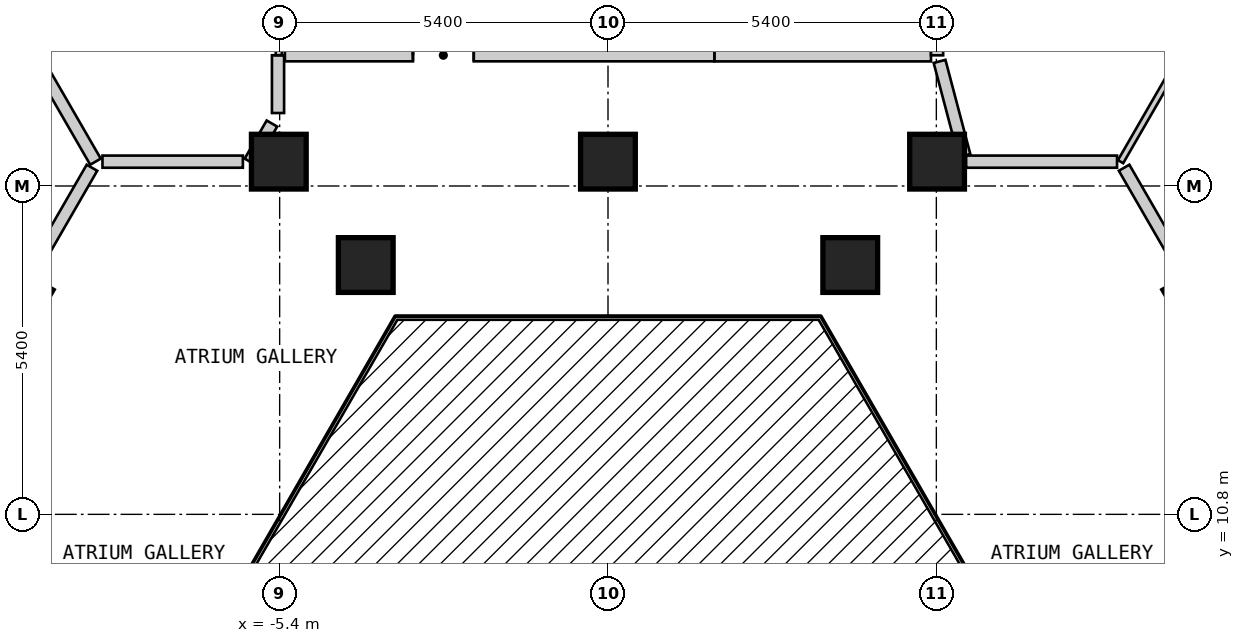
"""IFC4 building model, lengths in metres.
Left out: names, types, materials, properties, quantities, classifications, styles, units other than length and angle.
Written with IfcOpenShell. Run it as: python <this file> out.ifc"""

import sys

from ifc_helpers import new_model, si_unit, direction, frame, frame_2d, origin, origin_2d, place, context, subcontext, project, spatial, rectangle, extrude, element, fill, save


model = new_model("IFC4")
c1 = context("Model", 3, precision=1e-05, world=origin(), true_north=direction((0.0, 1.0)))
c2 = subcontext(c1, "Body", "Model", "MODEL_VIEW")
j1 = project(units=[si_unit("LENGTHUNIT", "METRE"), si_unit("PLANEANGLEUNIT", "RADIAN")], contexts=[c1])
p1 = place(None, origin())
s1 = spatial("IfcSite", under=j1, at=p1, CompositionType="ELEMENT")
p2 = place(p1, origin())
s2 = spatial("IfcBuilding", under=s1, at=p2, CompositionType="ELEMENT")
p3 = place(p2, frame((0.0, 0.0, 102.0)))
s3 = spatial("IfcBuildingStorey", under=s2, at=p3, CompositionType="ELEMENT", Elevation=102.0)
for number, where, z_axis, x_axis in (
    (1, (9.743, 14.325, 0.0), (0.0, 0.0, 1.0), (-0.5, 0.866, 0.0)),
    (2, (5.412, 16.6, 0.0), (0.0, 0.0, 1.0), (-1.0, 0.0, 0.0)),
    (3, (3.984, 14.9, 0.0), (0.0, 0.0, 1.0), (1.0, 0.0, 0.0)),
    (4, (-0.001, 16.6, 0.0), (0.0, 0.0, 1.0), (-1.0, 0.0, 0.0)),
    (5, (-3.984, 14.9, 0.0), (0.0, 0.0, 1.0), (1.0, 0.0, 0.0)),
    (6, (-5.414, 16.6, 0.0), (0.0, 0.0, 1.0), (-1.0, 0.0, 0.0)),
    (7, (-9.743, 14.325, 0.0), (0.0, 0.0, 1.0), (-0.5, -0.866, 0.0)),
):
    element("IfcColumn", number, at=place(p3, frame(where, z_axis=z_axis, x_axis=x_axis)), inside=s3, PredefinedType="COLUMN", context=c2, shape_type="SweptSolid", body=[
        extrude(rectangle(XDim=0.9, YDim=0.9, at=origin_2d()), origin(), (0.0, 0.0, 1.0), 3.0),
    ])
p4 = place(p3, frame((5.453, 18.249, 0.0), z_axis=(0.0, 0.0, 1.0), x_axis=(0.255385747764, -0.966839241983, 0.0)))
e8 = element("IfcWall", 8, at=p4, inside=s3, PredefinedType="PARTITIONING", context=c2, shape_type="SweptSolid", body=[
    extrude(rectangle(XDim=1.602, YDim=0.2, at=frame_2d((0.801, 0.0))), origin(), (0.0, 0.0, 1.0), 2.7),
])
p5 = place(p3, frame((8.488, 16.5, 0.0), z_axis=(0.0, 0.0, 1.0), x_axis=(0.499986836607, -0.86603300354, 0.0)))
e9 = element("IfcWall", 9, at=p5, inside=s3, PredefinedType="PARTITIONING", context=c2, shape_type="SweptSolid", body=[
    extrude(rectangle(XDim=20.09, YDim=0.2, at=frame_2d((10.045, 0.0))), origin(), (0.0, 0.0, 1.0), 2.7),
])
p6 = place(p5, frame((14.569, 0.0, 0.0)))
e10 = element("IfcOpeningElement", 10, at=p6, cuts=e9, PredefinedType="OPENING", context=c2, shape_type="SweptSolid", body=[
    extrude(rectangle(XDim=1.0, YDim=2.1, at=frame_2d((0.5, 1.05))), frame((0.0, 0.11, 0.0), z_axis=(0.0, -1.0, 0.0), x_axis=(1.0, 0.0, 0.0)), (0.0, 0.0, 1.0), 0.22),
])
p7 = place(p5, frame((4.547, 0.0, 0.0)))
e11 = element("IfcOpeningElement", 11, at=p7, cuts=e9, PredefinedType="OPENING", context=c2, shape_type="SweptSolid", body=[
    extrude(rectangle(XDim=1.0, YDim=2.1, at=frame_2d((0.5, 1.05))), frame((0.0, 0.11, 0.0), z_axis=(0.0, -1.0, 0.0), x_axis=(1.0, 0.0, 0.0)), (0.0, 0.0, 1.0), 0.22),
])
p8 = place(p3, frame((-8.314, 16.6, 0.0), z_axis=(0.0, 0.0, 1.0), x_axis=(1.0, 0.0, 0.0)))
e12 = element("IfcWall", 12, at=p8, inside=s3, PredefinedType="PARTITIONING", context=c2, shape_type="SweptSolid", body=[
    extrude(rectangle(XDim=2.309, YDim=0.2, at=frame_2d((1.155, 0.0))), origin(), (0.0, 0.0, 1.0), 2.7),
])
p9 = place(p3, frame((5.889, 16.6, 0.0), z_axis=(0.0, 0.0, 1.0), x_axis=(1.0, 0.0, 0.0)))
e13 = element("IfcWall", 13, at=p9, inside=s3, PredefinedType="PARTITIONING", context=c2, shape_type="SweptSolid", body=[
    extrude(rectangle(XDim=2.483, YDim=0.2, at=frame_2d((1.242, 0.0))), origin(), (0.0, 0.0, 1.0), 2.7),
])
p10 = place(p3, frame((1.75, 18.349, 0.0), z_axis=(0.0, 0.0, 1.0), x_axis=(1.0, 0.0, 0.0)))
e14 = element("IfcWall", 14, at=p10, inside=s3, PredefinedType="PARTITIONING", context=c2, shape_type="SweptSolid", body=[
    extrude(rectangle(XDim=3.562, YDim=0.2, at=frame_2d((1.781, 0.0))), origin(), (0.0, 0.0, 1.0), 2.7),
])
p11 = place(p3, frame((-5.314, 18.35, 0.0), z_axis=(0.0, 0.0, 1.0), x_axis=(1.0, 0.0, 0.0)))
e15 = element("IfcWall", 15, at=p11, inside=s3, PredefinedType="PARTITIONING", context=c2, shape_type="SweptSolid", body=[
    extrude(rectangle(XDim=7.063, YDim=0.2, at=frame_2d((3.531, 0.0))), origin(), (0.0, 0.0, 1.0), 2.7),
])
p12 = place(p11, frame((2.106, 0.0, 0.0)))
e16 = element("IfcOpeningElement", 16, at=p12, cuts=e15, PredefinedType="OPENING", context=c2, shape_type="SweptSolid", body=[
    extrude(rectangle(XDim=1.0, YDim=2.1, at=frame_2d((0.5, 1.05))), frame((0.0, 0.11, 0.0), z_axis=(0.0, -1.0, 0.0), x_axis=(1.0, 0.0, 0.0)), (0.0, 0.0, 1.0), 0.22),
])
p13 = place(p3, frame((-5.889, 16.6, 0.0), z_axis=(0.0, 0.0, 1.0), x_axis=(0.499839240638, 0.866118198353, 0.0)))
e17 = element("IfcWall", 17, at=p13, inside=s3, PredefinedType="PARTITIONING", context=c2, shape_type="SweptSolid", body=[
    extrude(rectangle(XDim=0.724, YDim=0.2, at=frame_2d((0.362, 0.0))), origin(), (0.0, 0.0, 1.0), 2.7),
])
p14 = place(p3, frame((-18.562, -0.951, 0.0), z_axis=(0.0, 0.0, 1.0), x_axis=(0.499987097491, 0.866032852923, 0.0)))
e18 = element("IfcWall", 18, at=p14, inside=s3, PredefinedType="PARTITIONING", context=c2, shape_type="SweptSolid", body=[
    extrude(rectangle(XDim=20.15, YDim=0.2, at=frame_2d((10.075, 0.0))), origin(), (0.0, 0.0, 1.0), 2.7),
])
p15 = place(p14, frame((14.627, 0.0, 0.0)))
e19 = element("IfcOpeningElement", 19, at=p15, cuts=e18, PredefinedType="OPENING", context=c2, shape_type="SweptSolid", body=[
    extrude(rectangle(XDim=1.0, YDim=2.1, at=frame_2d((0.5, 1.05))), frame((0.0, 0.11, 0.0), z_axis=(0.0, -1.0, 0.0), x_axis=(1.0, 0.0, 0.0)), (0.0, 0.0, 1.0), 0.22),
])
p16 = place(p14, frame((9.604, 0.0, 0.0)))
e20 = element("IfcOpeningElement", 20, at=p16, cuts=e18, PredefinedType="OPENING", context=c2, shape_type="SweptSolid", body=[
    extrude(rectangle(XDim=1.0, YDim=2.1, at=frame_2d((0.5, 1.05))), frame((0.0, 0.11, 0.0), z_axis=(0.0, -1.0, 0.0), x_axis=(1.0, 0.0, 0.0)), (0.0, 0.0, 1.0), 0.22),
])
p17 = place(p3, frame((-5.427, 17.4, 0.0), z_axis=(0.0, 0.0, 1.0), x_axis=(0.0, 1.0, 0.0)))
e21 = element("IfcWall", 21, at=p17, inside=s3, PredefinedType="PARTITIONING", context=c2, shape_type="SweptSolid", body=[
    extrude(rectangle(XDim=0.95, YDim=0.2, at=frame_2d((0.475, 0.0))), origin(), (0.0, 0.0, 1.0), 2.7),
])
p18 = place(p3, frame((8.43, 16.6, 0.0), z_axis=(0.0, 0.0, 1.0), x_axis=(0.499951460778, 0.866053426104, 0.0)))
e22 = element("IfcWall", 22, at=p18, inside=s3, PredefinedType="PARTITIONING", context=c2, shape_type="SweptSolid", body=[
    extrude(rectangle(XDim=4.553, YDim=0.1, at=frame_2d((2.276, 0.0))), origin(), (0.0, 0.0, 1.0), 2.7),
])
p19 = place(p3, frame((-5.414, 18.35, 0.0), z_axis=(0.0, 0.0, 1.0), x_axis=(0.0, 1.0, 0.0)))
e23 = element("IfcWall", 23, at=p19, inside=s3, PredefinedType="PARTITIONING", context=c2, shape_type="SweptSolid", body=[
    extrude(rectangle(XDim=8.35, YDim=0.1, at=frame_2d((4.175, 0.0))), origin(), (0.0, 0.0, 1.0), 2.7),
])
p20 = place(p19, frame((1.322, 0.0, 0.0)))
e24 = element("IfcOpeningElement", 24, at=p20, cuts=e23, PredefinedType="OPENING", context=c2, shape_type="SweptSolid", body=[
    extrude(rectangle(XDim=0.8, YDim=2.1, at=frame_2d((0.4, 1.05))), frame((0.0, 0.06, 0.0), z_axis=(0.0, -1.0, 0.0), x_axis=(1.0, 0.0, 0.0)), (0.0, 0.0, 1.0), 0.12),
])
p21 = place(p19, frame((5.447, 0.0, 0.0)))
e25 = element("IfcOpeningElement", 25, at=p21, cuts=e23, PredefinedType="OPENING", context=c2, shape_type="SweptSolid", body=[
    extrude(rectangle(XDim=0.9, YDim=2.1, at=frame_2d((0.45, 1.05))), frame((0.0, 0.06, 0.0), z_axis=(0.0, -1.0, 0.0), x_axis=(1.0, 0.0, 0.0)), (0.0, 0.0, 1.0), 0.12),
])
p22 = place(p3, frame((-10.727, 20.58, 0.0), z_axis=(0.0, 0.0, 1.0), x_axis=(0.500041272028, -0.866001574057, 0.0)))
e26 = element("IfcWall", 26, at=p22, inside=s3, PredefinedType="PARTITIONING", context=c2, shape_type="SweptSolid", body=[
    extrude(rectangle(XDim=4.596, YDim=0.2, at=frame_2d((2.298, 0.0))), origin(), (0.0, 0.0, 1.0), 2.7),
])
p23 = place(p3, frame((5.412, 18.349, 0.0), z_axis=(0.0, 0.0, 1.0), x_axis=(0.0, 1.0, 0.0)))
e27 = element("IfcWall", 27, at=p23, inside=s3, PredefinedType="PARTITIONING", context=c2, shape_type="SweptSolid", body=[
    extrude(rectangle(XDim=8.351, YDim=0.2, at=frame_2d((4.175, 0.0))), origin(), (0.0, 0.0, 1.0), 2.7),
])
p24 = place(p12, origin())
e28 = element("IfcDoor", 28, at=p24, inside=s3, OperationType="SINGLE_SWING_LEFT", PredefinedType="DOOR", context=c2, shape_type="SweptSolid", body=[
    extrude(rectangle(XDim=1.0, YDim=2.1, at=frame_2d((0.5, 1.05))), frame((0.0, 0.025, 0.0), z_axis=(0.0, -1.0, 0.0), x_axis=(1.0, 0.0, 0.0)), (0.0, 0.0, 1.0), 0.05),
])
fill(e16, e28)
save(model, sys.argv[1])
